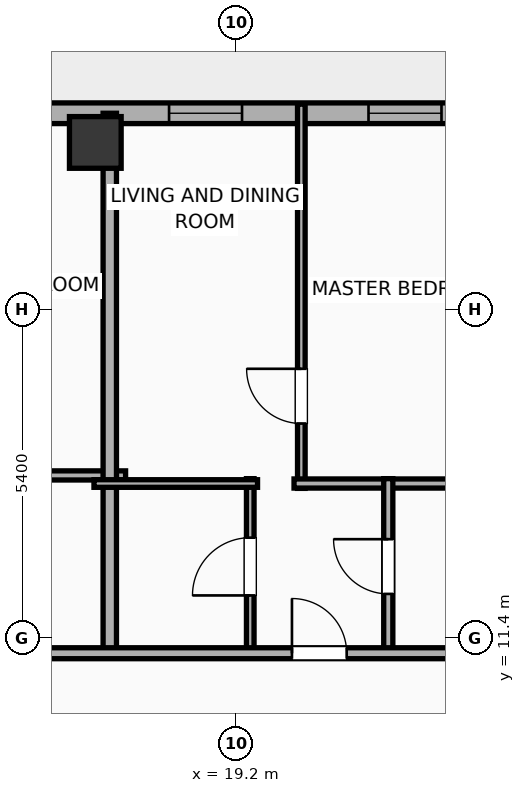
"""IFC4 building model, lengths in metres.
Left out: names, types, materials, properties, quantities, classifications, styles, units other than length and angle.
Written with IfcOpenShell. Run it as: python <this file> out.ifc"""

import sys

from ifc_helpers import new_model, si_unit, direction, frame, frame_2d, origin, origin_2d, place, context, subcontext, project, spatial, rectangle, hollow_rectangle, extrude, element, fill, save


model = new_model("IFC4")
c1 = context("Model", 3, precision=1e-05, world=origin(), true_north=direction((0.0, 1.0)))
c2 = subcontext(c1, "Body", "Model", "MODEL_VIEW")
j1 = project(units=[si_unit("LENGTHUNIT", "METRE"), si_unit("PLANEANGLEUNIT", "RADIAN")], contexts=[c1])
p1 = place(None, origin())
s1 = spatial("IfcSite", under=j1, at=p1, CompositionType="ELEMENT")
p2 = place(p1, origin())
s2 = spatial("IfcBuilding", under=s1, at=p2, CompositionType="ELEMENT")
p3 = place(p2, frame((0.0, 0.0, 231.4)))
s3 = spatial("IfcBuildingStorey", under=s2, at=p3, CompositionType="ELEMENT", Elevation=231.4)
p4 = place(p3, frame((16.88, 19.55, 0.0), z_axis=(0.0, 0.0, 1.0), x_axis=(1.0, 0.0, 0.0)))
e1 = element("IfcColumn", 1, at=p4, inside=s3, PredefinedType="COLUMN", context=c2, shape_type="SweptSolid", body=[
    extrude(hollow_rectangle(XDim=0.85, YDim=0.85, WallThickness=0.028, at=origin_2d()), origin(), (0.0, 0.0, 1.0), 3.9),
])
p5 = place(p3, frame((-22.783, 20.03, 0.0), z_axis=(0.0, 0.0, 1.0), x_axis=(1.0, 0.0, 0.0)))
e2 = element("IfcWall", 2, at=p5, inside=s3, PredefinedType="ELEMENTEDWALL", context=c2, shape_type="SweptSolid", body=[
    extrude(rectangle(XDim=49.566, YDim=0.34, at=frame_2d((24.783, 0.0))), origin(), (0.0, 0.0, 1.0), 3.65),
])
p6 = place(p5, frame((14.12, 0.0, 0.0)))
e3 = element("IfcOpeningElement", 3, at=p6, cuts=e2, PredefinedType="OPENING", context=c2, shape_type="SweptSolid", body=[
    extrude(rectangle(XDim=1.5, YDim=2.05, at=frame_2d((0.75, 1.025))), frame((0.0, 0.18, 0.0), z_axis=(0.0, -1.0, 0.0), x_axis=(1.0, 0.0, 0.0)), (0.0, 0.0, 1.0), 0.36),
])
p7 = place(p5, frame((6.211, 0.0, 0.75)))
e4 = element("IfcOpeningElement", 4, at=p7, cuts=e2, PredefinedType="OPENING", context=c2, shape_type="SweptSolid", body=[
    extrude(rectangle(XDim=2.4, YDim=2.1, at=frame_2d((1.2, 1.05))), frame((0.0, 0.18, 0.0), z_axis=(0.0, -1.0, 0.0), x_axis=(1.0, 0.0, 0.0)), (0.0, 0.0, 1.0), 0.36),
])
p8 = place(p5, frame((23.583, 0.0, 0.75)))
e5 = element("IfcOpeningElement", 5, at=p8, cuts=e2, PredefinedType="OPENING", context=c2, shape_type="SweptSolid", body=[
    extrude(rectangle(XDim=2.4, YDim=2.1, at=frame_2d((1.2, 1.05))), frame((0.0, 0.18, 0.0), z_axis=(0.0, -1.0, 0.0), x_axis=(1.0, 0.0, 0.0)), (0.0, 0.0, 1.0), 0.36),
])
p9 = place(p5, frame((33.947, 0.0, 0.0)))
e6 = element("IfcOpeningElement", 6, at=p9, cuts=e2, PredefinedType="OPENING", context=c2, shape_type="SweptSolid", body=[
    extrude(rectangle(XDim=1.5, YDim=2.05, at=frame_2d((0.75, 1.025))), frame((0.0, 0.18, 0.0), z_axis=(0.0, -1.0, 0.0), x_axis=(1.0, 0.0, 0.0)), (0.0, 0.0, 1.0), 0.36),
])
p10 = place(p5, frame((2.36, 0.0, 0.75)))
e7 = element("IfcOpeningElement", 7, at=p10, cuts=e2, PredefinedType="OPENING", context=c2, shape_type="SweptSolid", body=[
    extrude(rectangle(XDim=1.2, YDim=2.05, at=frame_2d((0.6, 1.025))), frame((0.0, 0.18, 0.0), z_axis=(0.0, -1.0, 0.0), x_axis=(1.0, 0.0, 0.0)), (0.0, 0.0, 1.0), 0.36),
])
p11 = place(p5, frame((10.598, 0.0, 0.75)))
e8 = element("IfcOpeningElement", 8, at=p11, cuts=e2, PredefinedType="OPENING", context=c2, shape_type="SweptSolid", body=[
    extrude(rectangle(XDim=1.2, YDim=2.05, at=frame_2d((0.6, 1.025))), frame((0.0, 0.18, 0.0), z_axis=(0.0, -1.0, 0.0), x_axis=(1.0, 0.0, 0.0)), (0.0, 0.0, 1.0), 0.36),
])
p12 = place(p5, frame((17.478, 0.0, 0.75)))
e9 = element("IfcOpeningElement", 9, at=p12, cuts=e2, PredefinedType="OPENING", context=c2, shape_type="SweptSolid", body=[
    extrude(rectangle(XDim=1.2, YDim=2.05, at=frame_2d((0.6, 1.025))), frame((0.0, 0.18, 0.0), z_axis=(0.0, -1.0, 0.0), x_axis=(1.0, 0.0, 0.0)), (0.0, 0.0, 1.0), 0.36),
])
p13 = place(p5, frame((20.978, 0.0, 0.75)))
e10 = element("IfcOpeningElement", 10, at=p13, cuts=e2, PredefinedType="OPENING", context=c2, shape_type="SweptSolid", body=[
    extrude(rectangle(XDim=1.2, YDim=2.05, at=frame_2d((0.6, 1.025))), frame((0.0, 0.18, 0.0), z_axis=(0.0, -1.0, 0.0), x_axis=(1.0, 0.0, 0.0)), (0.0, 0.0, 1.0), 0.36),
])
p14 = place(p5, frame((27.758, 0.0, 0.75)))
e11 = element("IfcOpeningElement", 11, at=p14, cuts=e2, PredefinedType="OPENING", context=c2, shape_type="SweptSolid", body=[
    extrude(rectangle(XDim=1.2, YDim=2.05, at=frame_2d((0.6, 1.025))), frame((0.0, 0.18, 0.0), z_axis=(0.0, -1.0, 0.0), x_axis=(1.0, 0.0, 0.0)), (0.0, 0.0, 1.0), 0.36),
])
p15 = place(p5, frame((31.037, 0.0, 0.75)))
e12 = element("IfcOpeningElement", 12, at=p15, cuts=e2, PredefinedType="OPENING", context=c2, shape_type="SweptSolid", body=[
    extrude(rectangle(XDim=1.2, YDim=2.05, at=frame_2d((0.6, 1.025))), frame((0.0, 0.18, 0.0), z_axis=(0.0, -1.0, 0.0), x_axis=(1.0, 0.0, 0.0)), (0.0, 0.0, 1.0), 0.36),
])
p16 = place(p5, frame((37.596, 0.0, 0.75)))
e13 = element("IfcOpeningElement", 13, at=p16, cuts=e2, PredefinedType="OPENING", context=c2, shape_type="SweptSolid", body=[
    extrude(rectangle(XDim=1.2, YDim=2.05, at=frame_2d((0.6, 1.025))), frame((0.0, 0.18, 0.0), z_axis=(0.0, -1.0, 0.0), x_axis=(1.0, 0.0, 0.0)), (0.0, 0.0, 1.0), 0.36),
])
p17 = place(p5, frame((40.876, 0.0, 0.75)))
e14 = element("IfcOpeningElement", 14, at=p17, cuts=e2, PredefinedType="OPENING", context=c2, shape_type="SweptSolid", body=[
    extrude(rectangle(XDim=1.2, YDim=2.05, at=frame_2d((0.6, 1.025))), frame((0.0, 0.18, 0.0), z_axis=(0.0, -1.0, 0.0), x_axis=(1.0, 0.0, 0.0)), (0.0, 0.0, 1.0), 0.36),
])
p18 = place(p5, frame((44.156, 0.0, 0.75)))
e15 = element("IfcOpeningElement", 15, at=p18, cuts=e2, PredefinedType="OPENING", context=c2, shape_type="SweptSolid", body=[
    extrude(rectangle(XDim=1.2, YDim=2.05, at=frame_2d((0.6, 1.025))), frame((0.0, 0.18, 0.0), z_axis=(0.0, -1.0, 0.0), x_axis=(1.0, 0.0, 0.0)), (0.0, 0.0, 1.0), 0.36),
])
p19 = place(p5, frame((46.969, 0.0, 0.75)))
e16 = element("IfcOpeningElement", 16, at=p19, cuts=e2, PredefinedType="OPENING", context=c2, shape_type="SweptSolid", body=[
    extrude(rectangle(XDim=1.2, YDim=2.05, at=frame_2d((0.6, 1.025))), frame((0.0, 0.18, 0.0), z_axis=(0.0, -1.0, 0.0), x_axis=(1.0, 0.0, 0.0)), (0.0, 0.0, 1.0), 0.36),
])
p20 = place(p3, frame((13.588, 14.074, 0.0), z_axis=(0.0, 0.0, 1.0), x_axis=(1.0, 0.0, 0.0)))
e17 = element("IfcWall", 17, at=p20, inside=s3, PredefinedType="PLUMBINGWALL", context=c2, shape_type="SweptSolid", body=[
    extrude(rectangle(XDim=3.79, YDim=0.15, at=frame_2d((1.895, 0.0))), origin(), (0.0, 0.0, 1.0), 3.65),
])
p21 = place(p3, frame((17.118, 11.07, 0.0), z_axis=(0.0, 0.0, 1.0), x_axis=(0.0, 1.0, 0.0)))
e18 = element("IfcWall", 18, at=p21, inside=s3, PredefinedType="PARTITIONING", context=c2, shape_type="SweptSolid", body=[
    extrude(rectangle(XDim=8.96, YDim=0.22, at=frame_2d((4.48, 0.0))), origin(), (0.0, 0.0, 1.0), 3.65),
])
p22 = place(p3, frame((20.268, 13.861, 0.0), z_axis=(0.0, 0.0, 1.0), x_axis=(0.0, 1.0, 0.0)))
e19 = element("IfcWall", 19, at=p22, inside=s3, PredefinedType="PARTITIONING", context=c2, shape_type="SweptSolid", body=[
    extrude(rectangle(XDim=6.319, YDim=0.125, at=frame_2d((3.159, 0.0))), origin(), (0.0, 0.0, 1.0), 3.65),
])
p23 = place(p22, frame((1.067, 0.0, 0.0)))
e20 = element("IfcOpeningElement", 20, at=p23, cuts=e19, PredefinedType="OPENING", context=c2, shape_type="SweptSolid", body=[
    extrude(rectangle(XDim=0.9, YDim=2.05, at=frame_2d((0.45, 1.025))), frame((0.0, 0.073, 0.0), z_axis=(0.0, -1.0, 0.0), x_axis=(1.0, 0.0, 0.0)), (0.0, 0.0, 1.0), 0.145),
])
p24 = place(p3, frame((20.148, 13.941, 0.0), z_axis=(0.0, 0.0, 1.0), x_axis=(1.0, 0.0, 0.0)))
e21 = element("IfcWall", 21, at=p24, inside=s3, PredefinedType="PLUMBINGWALL", context=c2, shape_type="SweptSolid", body=[
    extrude(rectangle(XDim=3.79, YDim=0.15, at=frame_2d((1.895, 0.0))), origin(), (0.0, 0.0, 1.0), 3.65),
])
p25 = place(p3, frame((19.428, 11.13, 0.0), z_axis=(0.0, 0.0, 1.0), x_axis=(0.0, 1.0, 0.0)))
e22 = element("IfcWall", 22, at=p25, inside=s3, PredefinedType="PARTITIONING", context=c2, shape_type="SweptSolid", body=[
    extrude(rectangle(XDim=2.891, YDim=0.125, at=frame_2d((1.446, 0.0))), origin(), (0.0, 0.0, 1.0), 3.65),
])
p26 = place(p25, frame((0.97, 0.0, 0.0)))
e23 = element("IfcOpeningElement", 23, at=p26, cuts=e22, PredefinedType="OPENING", context=c2, shape_type="SweptSolid", body=[
    extrude(rectangle(XDim=0.95, YDim=2.05, at=frame_2d((0.475, 1.025))), frame((0.0, 0.073, 0.0), z_axis=(0.0, -1.0, 0.0), x_axis=(1.0, 0.0, 0.0)), (0.0, 0.0, 1.0), 0.145),
])
p27 = place(p3, frame((16.858, 13.941, 0.0), z_axis=(0.0, 0.0, 1.0), x_axis=(1.0, 0.0, 0.0)))
e24 = element("IfcWall", 24, at=p27, inside=s3, PredefinedType="PARTITIONING", context=c2, shape_type="SweptSolid", body=[
    extrude(rectangle(XDim=2.69, YDim=0.125, at=frame_2d((1.345, 0.0))), origin(), (0.0, 0.0, 1.0), 3.65),
])
p28 = place(p3, frame((21.698, 11.13, 0.0), z_axis=(0.0, 0.0, 1.0), x_axis=(0.0, 1.0, 0.0)))
e25 = element("IfcWall", 25, at=p28, inside=s3, PredefinedType="PLUMBINGWALL", context=c2, shape_type="SweptSolid", body=[
    extrude(rectangle(XDim=2.891, YDim=0.15, at=frame_2d((1.446, 0.0))), origin(), (0.0, 0.0, 1.0), 3.65),
])
p29 = place(p28, frame((0.996, 0.0, 0.0)))
e26 = element("IfcOpeningElement", 26, at=p29, cuts=e25, PredefinedType="OPENING", context=c2, shape_type="SweptSolid", body=[
    extrude(rectangle(XDim=0.9, YDim=2.05, at=frame_2d((0.45, 1.025))), frame((0.0, 0.085, 0.0), z_axis=(0.0, -1.0, 0.0), x_axis=(1.0, 0.0, 0.0)), (0.0, 0.0, 1.0), 0.17),
])
p30 = place(p3, frame((-26.23, 11.15, 0.0), z_axis=(0.0, 0.0, 1.0), x_axis=(1.0, 0.0, 0.0)))
e27 = element("IfcWall", 27, at=p30, inside=s3, PredefinedType="PARTITIONING", context=c2, shape_type="SweptSolid", body=[
    extrude(rectangle(XDim=56.46, YDim=0.18, at=frame_2d((28.23, 0.0))), origin(), (0.0, 0.0, 1.0), 3.65),
])
p31 = place(p30, frame((3.614, 0.0, 0.0)))
e28 = element("IfcOpeningElement", 28, at=p31, cuts=e27, PredefinedType="OPENING", context=c2, shape_type="SweptSolid", body=[
    extrude(rectangle(XDim=1.15, YDim=2.05, at=frame_2d((0.575, 1.025))), frame((0.0, 0.1, 0.0), z_axis=(0.0, -1.0, 0.0), x_axis=(1.0, 0.0, 0.0)), (0.0, 0.0, 1.0), 0.2),
])
p32 = place(p30, frame((11.761, 0.0, 0.0)))
e29 = element("IfcOpeningElement", 29, at=p32, cuts=e27, PredefinedType="OPENING", context=c2, shape_type="SweptSolid", body=[
    extrude(rectangle(XDim=1.15, YDim=2.05, at=frame_2d((0.575, 1.025))), frame((0.0, 0.1, 0.0), z_axis=(0.0, -1.0, 0.0), x_axis=(1.0, 0.0, 0.0)), (0.0, 0.0, 1.0), 0.2),
])
p33 = place(p30, frame((19.447, 0.0, 0.0)))
e30 = element("IfcOpeningElement", 30, at=p33, cuts=e27, PredefinedType="OPENING", context=c2, shape_type="SweptSolid", body=[
    extrude(rectangle(XDim=0.9, YDim=2.05, at=frame_2d((0.45, 1.025))), frame((0.0, 0.1, 0.0), z_axis=(0.0, -1.0, 0.0), x_axis=(1.0, 0.0, 0.0)), (0.0, 0.0, 1.0), 0.2),
])
p34 = place(p30, frame((26.448, 0.0, 0.0)))
e31 = element("IfcOpeningElement", 31, at=p34, cuts=e27, PredefinedType="OPENING", context=c2, shape_type="SweptSolid", body=[
    extrude(rectangle(XDim=0.9, YDim=2.05, at=frame_2d((0.45, 1.025))), frame((0.0, 0.1, 0.0), z_axis=(0.0, -1.0, 0.0), x_axis=(1.0, 0.0, 0.0)), (0.0, 0.0, 1.0), 0.2),
])
p35 = place(p30, frame((33.223, 0.0, 0.0)))
e32 = element("IfcOpeningElement", 32, at=p35, cuts=e27, PredefinedType="OPENING", context=c2, shape_type="SweptSolid", body=[
    extrude(rectangle(XDim=0.9, YDim=2.05, at=frame_2d((0.45, 1.025))), frame((0.0, 0.1, 0.0), z_axis=(0.0, -1.0, 0.0), x_axis=(1.0, 0.0, 0.0)), (0.0, 0.0, 1.0), 0.2),
])
p36 = place(p30, frame((39.783, 0.0, 0.0)))
e33 = element("IfcOpeningElement", 33, at=p36, cuts=e27, PredefinedType="OPENING", context=c2, shape_type="SweptSolid", body=[
    extrude(rectangle(XDim=0.9, YDim=2.05, at=frame_2d((0.45, 1.025))), frame((0.0, 0.1, 0.0), z_axis=(0.0, -1.0, 0.0), x_axis=(1.0, 0.0, 0.0)), (0.0, 0.0, 1.0), 0.2),
])
p37 = place(p30, frame((46.344, 0.0, 0.0)))
e34 = element("IfcOpeningElement", 34, at=p37, cuts=e27, PredefinedType="OPENING", context=c2, shape_type="SweptSolid", body=[
    extrude(rectangle(XDim=0.9, YDim=2.05, at=frame_2d((0.45, 1.025))), frame((0.0, 0.1, 0.0), z_axis=(0.0, -1.0, 0.0), x_axis=(1.0, 0.0, 0.0)), (0.0, 0.0, 1.0), 0.2),
])
p38 = place(p30, frame((52.933, 0.0, 0.0)))
e35 = element("IfcOpeningElement", 35, at=p38, cuts=e27, PredefinedType="OPENING", context=c2, shape_type="SweptSolid", body=[
    extrude(rectangle(XDim=0.9, YDim=2.05, at=frame_2d((0.45, 1.025))), frame((0.0, 0.1, 0.0), z_axis=(0.0, -1.0, 0.0), x_axis=(1.0, 0.0, 0.0)), (0.0, 0.0, 1.0), 0.2),
])
p39 = place(p17, origin())
e36 = element("IfcWindow", 36, at=p39, inside=s3, PartitioningType="SINGLE_PANEL", PredefinedType="WINDOW", context=c2, shape_type="SweptSolid", body=[
    extrude(rectangle(XDim=1.2, YDim=2.05, at=frame_2d((0.6, 1.025))), frame((0.0, 0.03, 0.0), z_axis=(0.0, -1.0, 0.0), x_axis=(1.0, 0.0, 0.0)), (0.0, 0.0, 1.0), 0.06),
])
fill(e14, e36)
p40 = place(p18, origin())
e37 = element("IfcWindow", 37, at=p40, inside=s3, PartitioningType="SINGLE_PANEL", PredefinedType="WINDOW", context=c2, shape_type="SweptSolid", body=[
    extrude(rectangle(XDim=1.2, YDim=2.05, at=frame_2d((0.6, 1.025))), frame((0.0, 0.03, 0.0), z_axis=(0.0, -1.0, 0.0), x_axis=(1.0, 0.0, 0.0)), (0.0, 0.0, 1.0), 0.06),
])
fill(e15, e37)
p41 = place(p23, origin())
e38 = element("IfcDoor", 38, at=p41, inside=s3, OperationType="SINGLE_SWING_RIGHT", PredefinedType="DOOR", context=c2, shape_type="SweptSolid", body=[
    extrude(rectangle(XDim=0.9, YDim=2.05, at=frame_2d((0.45, 1.025))), frame((0.0, 0.025, 0.0), z_axis=(0.0, -1.0, 0.0), x_axis=(1.0, 0.0, 0.0)), (0.0, 0.0, 1.0), 0.05),
])
fill(e20, e38)
p42 = place(p26, origin())
e39 = element("IfcDoor", 39, at=p42, inside=s3, OperationType="SINGLE_SWING_LEFT", PredefinedType="DOOR", context=c2, shape_type="SweptSolid", body=[
    extrude(rectangle(XDim=0.95, YDim=2.05, at=frame_2d((0.475, 1.025))), frame((0.0, 0.025, 0.0), z_axis=(0.0, -1.0, 0.0), x_axis=(1.0, 0.0, 0.0)), (0.0, 0.0, 1.0), 0.05),
])
fill(e23, e39)
p43 = place(p29, origin())
e40 = element("IfcDoor", 40, at=p43, inside=s3, OperationType="SINGLE_SWING_RIGHT", PredefinedType="DOOR", context=c2, shape_type="SweptSolid", body=[
    extrude(rectangle(XDim=0.9, YDim=2.05, at=frame_2d((0.45, 1.025))), frame((0.0, 0.025, 0.0), z_axis=(0.0, -1.0, 0.0), x_axis=(1.0, 0.0, 0.0)), (0.0, 0.0, 1.0), 0.05),
])
fill(e26, e40)
p44 = place(p37, origin())
e41 = element("IfcDoor", 41, at=p44, inside=s3, OperationType="SINGLE_SWING_LEFT", PredefinedType="DOOR", context=c2, shape_type="SweptSolid", body=[
    extrude(rectangle(XDim=0.9, YDim=2.05, at=frame_2d((0.45, 1.025))), frame((0.0, 0.025, 0.0), z_axis=(0.0, -1.0, 0.0), x_axis=(1.0, 0.0, 0.0)), (0.0, 0.0, 1.0), 0.05),
])
fill(e34, e41)
save(model, sys.argv[1])
